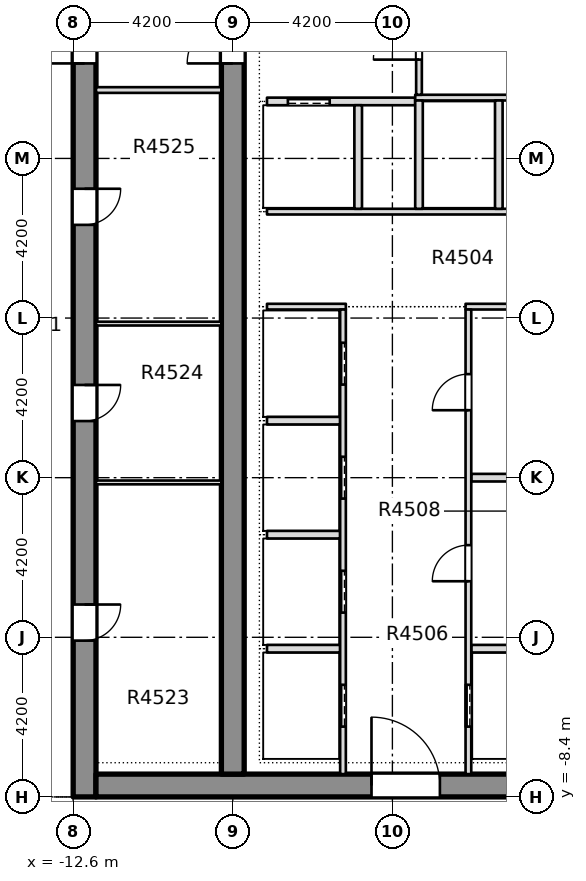
"""IFC4 building model, lengths in metres.
Left out: names, types, materials, properties, quantities, classifications, styles, units other than length and angle.
Written with IfcOpenShell. Run it as: python <this file> out.ifc"""

import sys

from ifc_helpers import new_model, si_unit, direction, frame, frame_2d, origin, place, context, subcontext, project, spatial, rectangle, extrude, element, fill, save


model = new_model("IFC4")
c1 = context("Model", 3, precision=1e-05, world=origin(), true_north=direction((0.0, 1.0)))
c2 = subcontext(c1, "Body", "Model", "MODEL_VIEW")
j1 = project(units=[si_unit("LENGTHUNIT", "METRE"), si_unit("PLANEANGLEUNIT", "RADIAN")], contexts=[c1])
p1 = place(None, origin())
s1 = spatial("IfcSite", under=j1, at=p1, CompositionType="ELEMENT")
p2 = place(p1, origin())
s2 = spatial("IfcBuilding", under=s1, at=p2, CompositionType="ELEMENT")
p3 = place(p2, frame((0.0, 0.0, 175.55)))
s3 = spatial("IfcBuildingStorey", under=s2, at=p3, CompositionType="ELEMENT", Elevation=175.55)
p4 = place(p3, frame((-12.3, -8.4, -0.4), z_axis=(0.0, 0.0, 1.0), x_axis=(0.0, 1.0, 0.0)))
e1 = element("IfcWall", 1, at=p4, inside=s3, PredefinedType="SHEAR", context=c2, shape_type="SweptSolid", body=[
    extrude(rectangle(XDim=30.15, YDim=0.6, at=frame_2d((15.075, 0.0))), origin(), (0.0, 0.0, 1.0), 3.45),
])
p5 = place(p4, frame((4.113, 0.0, 0.4)))
e2 = element("IfcOpeningElement", 2, at=p5, cuts=e1, PredefinedType="OPENING", context=c2, shape_type="SweptSolid", body=[
    extrude(rectangle(XDim=0.95, YDim=2.1, at=frame_2d((0.475, 1.05))), frame((0.0, 0.31, 0.0), z_axis=(0.0, -1.0, 0.0), x_axis=(1.0, 0.0, 0.0)), (0.0, 0.0, 1.0), 0.62),
])
p6 = place(p4, frame((9.89, 0.0, 0.4)))
e3 = element("IfcOpeningElement", 3, at=p6, cuts=e1, PredefinedType="OPENING", context=c2, shape_type="SweptSolid", body=[
    extrude(rectangle(XDim=0.95, YDim=2.1, at=frame_2d((0.475, 1.05))), frame((0.0, 0.31, 0.0), z_axis=(0.0, -1.0, 0.0), x_axis=(1.0, 0.0, 0.0)), (0.0, 0.0, 1.0), 0.62),
])
p7 = place(p4, frame((15.052, 0.0, 0.4)))
e4 = element("IfcOpeningElement", 4, at=p7, cuts=e1, PredefinedType="OPENING", context=c2, shape_type="SweptSolid", body=[
    extrude(rectangle(XDim=0.95, YDim=2.1, at=frame_2d((0.475, 1.05))), frame((0.0, 0.31, 0.0), z_axis=(0.0, -1.0, 0.0), x_axis=(1.0, 0.0, 0.0)), (0.0, 0.0, 1.0), 0.62),
])
p8 = place(p4, frame((22.144, 0.0, 0.4)))
e5 = element("IfcOpeningElement", 5, at=p8, cuts=e1, PredefinedType="OPENING", context=c2, shape_type="SweptSolid", body=[
    extrude(rectangle(XDim=0.95, YDim=2.1, at=frame_2d((0.475, 1.05))), frame((0.0, 0.31, 0.0), z_axis=(0.0, -1.0, 0.0), x_axis=(1.0, 0.0, 0.0)), (0.0, 0.0, 1.0), 0.62),
])
p9 = place(p4, frame((24.998, 0.0, 0.4)))
e6 = element("IfcOpeningElement", 6, at=p9, cuts=e1, PredefinedType="OPENING", context=c2, shape_type="SweptSolid", body=[
    extrude(rectangle(XDim=0.95, YDim=2.1, at=frame_2d((0.475, 1.05))), frame((0.0, 0.31, 0.0), z_axis=(0.0, -1.0, 0.0), x_axis=(1.0, 0.0, 0.0)), (0.0, 0.0, 1.0), 0.62),
])
p10 = place(p4, frame((27.605, 0.0, 0.4)))
e7 = element("IfcOpeningElement", 7, at=p10, cuts=e1, PredefinedType="OPENING", context=c2, shape_type="SweptSolid", body=[
    extrude(rectangle(XDim=0.95, YDim=2.1, at=frame_2d((0.475, 1.05))), frame((0.0, 0.31, 0.0), z_axis=(0.0, -1.0, 0.0), x_axis=(1.0, 0.0, 0.0)), (0.0, 0.0, 1.0), 0.62),
])
p11 = place(p4, frame((19.3, 0.0, 0.4)))
e8 = element("IfcOpeningElement", 8, at=p11, cuts=e1, PredefinedType="OPENING", context=c2, shape_type="SweptSolid", body=[
    extrude(rectangle(XDim=1.2, YDim=2.1, at=frame_2d((0.6, 1.05))), frame((0.0, 0.31, 0.0), z_axis=(0.0, -1.0, 0.0), x_axis=(1.0, 0.0, 0.0)), (0.0, 0.0, 1.0), 0.62),
])
p12 = place(p3, frame((-12.0, -8.1, -0.4), z_axis=(0.0, 0.0, 1.0), x_axis=(1.0, 0.0, 0.0)))
e9 = element("IfcWall", 9, at=p12, inside=s3, PredefinedType="SHEAR", context=c2, shape_type="SweptSolid", body=[
    extrude(rectangle(XDim=24.0, YDim=0.6, at=frame_2d((12.0, 0.0))), origin(), (0.0, 0.0, 1.0), 3.45),
])
p13 = place(p12, frame((7.25, 0.0, 0.4)))
e10 = element("IfcOpeningElement", 10, at=p13, cuts=e9, PredefinedType="OPENING", context=c2, shape_type="SweptSolid", body=[
    extrude(rectangle(XDim=1.8, YDim=2.1, at=frame_2d((0.9, 1.05))), frame((0.0, 0.31, 0.0), z_axis=(0.0, -1.0, 0.0), x_axis=(1.0, 0.0, 0.0)), (0.0, 0.0, 1.0), 0.62),
])
p14 = place(p12, frame((14.95, 0.0, 0.4)))
e11 = element("IfcOpeningElement", 11, at=p14, cuts=e9, PredefinedType="OPENING", context=c2, shape_type="SweptSolid", body=[
    extrude(rectangle(XDim=1.8, YDim=2.1, at=frame_2d((0.9, 1.05))), frame((0.0, 0.31, 0.0), z_axis=(0.0, -1.0, 0.0), x_axis=(1.0, 0.0, 0.0)), (0.0, 0.0, 1.0), 0.62),
])
p15 = place(p3, frame((-8.4, -7.8, -0.4), z_axis=(0.0, 0.0, 1.0), x_axis=(0.0, 1.0, 0.0)))
e12 = element("IfcWall", 12, at=p15, inside=s3, PredefinedType="SHEAR", context=c2, shape_type="SweptSolid", body=[
    extrude(rectangle(XDim=28.95, YDim=0.6, at=frame_2d((14.475, 0.0))), origin(), (0.0, 0.0, 1.0), 3.45),
])
p16 = place(p15, frame((18.7, 0.0, 0.4)))
e13 = element("IfcOpeningElement", 13, at=p16, cuts=e12, PredefinedType="OPENING", context=c2, shape_type="SweptSolid", body=[
    extrude(rectangle(XDim=1.2, YDim=2.1, at=frame_2d((0.6, 1.05))), frame((0.0, 0.31, 0.0), z_axis=(0.0, -1.0, 0.0), x_axis=(1.0, 0.0, 0.0)), (0.0, 0.0, 1.0), 0.62),
])
p17 = place(p3, frame((-7.5, -4.5, 0.0), z_axis=(0.0, 0.0, 1.0), x_axis=(1.0, 0.0, 0.0)))
e14 = element("IfcWall", 14, at=p17, inside=s3, PredefinedType="PARTITIONING", context=c2, shape_type="SweptSolid", body=[
    extrude(rectangle(XDim=1.925, YDim=0.2, at=frame_2d((0.962, 0.0))), origin(), (0.0, 0.0, 1.0), 3.05),
])
p18 = place(p3, frame((-2.125, -4.5, 0.0), z_axis=(0.0, 0.0, 1.0), x_axis=(1.0, 0.0, 0.0)))
e15 = element("IfcWall", 15, at=p18, inside=s3, PredefinedType="PARTITIONING", context=c2, shape_type="SweptSolid", body=[
    extrude(rectangle(XDim=2.025, YDim=0.2, at=frame_2d((1.012, 0.0))), origin(), (0.0, 0.0, 1.0), 3.05),
])
p19 = place(p3, frame((-7.5, -1.5, 0.0), z_axis=(0.0, 0.0, 1.0), x_axis=(1.0, 0.0, 0.0)))
e16 = element("IfcWall", 16, at=p19, inside=s3, PredefinedType="PARTITIONING", context=c2, shape_type="SweptSolid", body=[
    extrude(rectangle(XDim=1.925, YDim=0.2, at=frame_2d((0.962, 0.0))), origin(), (0.0, 0.0, 1.0), 3.05),
])
p20 = place(p3, frame((-2.125, 0.0, 0.0), z_axis=(0.0, 0.0, 1.0), x_axis=(1.0, 0.0, 0.0)))
e17 = element("IfcWall", 17, at=p20, inside=s3, PredefinedType="PARTITIONING", context=c2, shape_type="SweptSolid", body=[
    extrude(rectangle(XDim=2.025, YDim=0.2, at=frame_2d((1.012, 0.0))), origin(), (0.0, 0.0, 1.0), 3.05),
])
p21 = place(p3, frame((-7.5, 1.5, 0.0), z_axis=(0.0, 0.0, 1.0), x_axis=(1.0, 0.0, 0.0)))
e18 = element("IfcWall", 18, at=p21, inside=s3, PredefinedType="PARTITIONING", context=c2, shape_type="SweptSolid", body=[
    extrude(rectangle(XDim=1.925, YDim=0.2, at=frame_2d((0.962, 0.0))), origin(), (0.0, 0.0, 1.0), 3.05),
])
p22 = place(p3, frame((-7.5, 4.5, 0.0), z_axis=(0.0, 0.0, 1.0), x_axis=(1.0, 0.0, 0.0)))
e19 = element("IfcWall", 19, at=p22, inside=s3, PredefinedType="PARTITIONING", context=c2, shape_type="SweptSolid", body=[
    extrude(rectangle(XDim=2.075, YDim=0.15, at=frame_2d((1.038, 0.0))), origin(), (0.0, 0.0, 1.0), 3.05),
])
p23 = place(p3, frame((-2.275, 4.5, 0.0), z_axis=(0.0, 0.0, 1.0), x_axis=(1.0, 0.0, 0.0)))
e20 = element("IfcWall", 20, at=p23, inside=s3, PredefinedType="PARTITIONING", context=c2, shape_type="SweptSolid", body=[
    extrude(rectangle(XDim=4.55, YDim=0.15, at=frame_2d((2.275, 0.0))), origin(), (0.0, 0.0, 1.0), 3.05),
])
p24 = place(p3, frame((-7.5, 7.0, 0.0), z_axis=(0.0, 0.0, 1.0), x_axis=(1.0, 0.0, 0.0)))
e21 = element("IfcWall", 21, at=p24, inside=s3, PredefinedType="PARTITIONING", context=c2, shape_type="SweptSolid", body=[
    extrude(rectangle(XDim=15.0, YDim=0.15, at=frame_2d((7.5, 0.0))), origin(), (0.0, 0.0, 1.0), 3.05),
])
p25 = place(p24, frame((6.8, 0.0, 0.0)))
e22 = element("IfcOpeningElement", 22, at=p25, cuts=e21, PredefinedType="OPENING", context=c2, shape_type="SweptSolid", body=[
    extrude(rectangle(XDim=1.4, YDim=2.1, at=frame_2d((0.7, 1.05))), frame((0.0, 0.085, 0.0), z_axis=(0.0, -1.0, 0.0), x_axis=(1.0, 0.0, 0.0)), (0.0, 0.0, 1.0), 0.17),
])
p26 = place(p3, frame((-7.5, 9.9, 0.0), z_axis=(0.0, 0.0, 1.0), x_axis=(1.0, 0.0, 0.0)))
e23 = element("IfcWall", 23, at=p26, inside=s3, PredefinedType="PARTITIONING", context=c2, shape_type="SweptSolid", body=[
    extrude(rectangle(XDim=3.9, YDim=0.2, at=frame_2d((1.95, 0.0))), origin(), (0.0, 0.0, 1.0), 3.05),
])
p27 = place(p26, frame((0.55, 0.0, 0.0)))
e24 = element("IfcOpeningElement", 24, at=p27, cuts=e23, PredefinedType="OPENING", context=c2, shape_type="SweptSolid", body=[
    extrude(rectangle(XDim=1.1, YDim=2.1, at=frame_2d((0.55, 1.05))), frame((0.0, 0.11, 0.0), z_axis=(0.0, -1.0, 0.0), x_axis=(1.0, 0.0, 0.0)), (0.0, 0.0, 1.0), 0.22),
])
p28 = place(p3, frame((-3.6, 10.0, 0.0), z_axis=(0.0, 0.0, 1.0), x_axis=(1.0, 0.0, 0.0)))
e25 = element("IfcWall", 25, at=p28, inside=s3, PredefinedType="PARTITIONING", context=c2, shape_type="SweptSolid", body=[
    extrude(rectangle(XDim=7.2, YDim=0.15, at=frame_2d((3.6, 0.0))), origin(), (0.0, 0.0, 1.0), 3.05),
])
p29 = place(p28, frame((2.9, 0.0, 0.0)))
e26 = element("IfcOpeningElement", 26, at=p29, cuts=e25, PredefinedType="OPENING", context=c2, shape_type="SweptSolid", body=[
    extrude(rectangle(XDim=1.4, YDim=2.1, at=frame_2d((0.7, 1.05))), frame((0.0, 0.085, 0.0), z_axis=(0.0, -1.0, 0.0), x_axis=(1.0, 0.0, 0.0)), (0.0, 0.0, 1.0), 0.17),
])
p30 = place(p3, frame((-5.5, -7.799, 0.0), z_axis=(0.0, 0.0, 1.0), x_axis=(0.0, 1.0, 0.0)))
e27 = element("IfcWall", 27, at=p30, inside=s3, PredefinedType="PARTITIONING", context=c2, shape_type="SweptSolid", body=[
    extrude(rectangle(XDim=12.224, YDim=0.15, at=frame_2d((6.112, 0.0))), origin(), (0.0, 0.0, 1.0), 3.05),
])
p31 = place(p30, frame((1.249, 0.0, 0.0)))
e28 = element("IfcOpeningElement", 28, at=p31, cuts=e27, PredefinedType="OPENING", context=c2, shape_type="SweptSolid", body=[
    extrude(rectangle(XDim=1.1, YDim=2.1, at=frame_2d((0.55, 1.05))), frame((0.0, 0.085, 0.0), z_axis=(0.0, -1.0, 0.0), x_axis=(1.0, 0.0, 0.0)), (0.0, 0.0, 1.0), 0.17),
])
p32 = place(p30, frame((4.249, 0.0, 0.0)))
e29 = element("IfcOpeningElement", 29, at=p32, cuts=e27, PredefinedType="OPENING", context=c2, shape_type="SweptSolid", body=[
    extrude(rectangle(XDim=1.1, YDim=2.1, at=frame_2d((0.55, 1.05))), frame((0.0, 0.085, 0.0), z_axis=(0.0, -1.0, 0.0), x_axis=(1.0, 0.0, 0.0)), (0.0, 0.0, 1.0), 0.17),
])
p33 = place(p30, frame((7.249, 0.0, 0.0)))
e30 = element("IfcOpeningElement", 30, at=p33, cuts=e27, PredefinedType="OPENING", context=c2, shape_type="SweptSolid", body=[
    extrude(rectangle(XDim=1.1, YDim=2.1, at=frame_2d((0.55, 1.05))), frame((0.0, 0.085, 0.0), z_axis=(0.0, -1.0, 0.0), x_axis=(1.0, 0.0, 0.0)), (0.0, 0.0, 1.0), 0.17),
])
p34 = place(p30, frame((10.249, 0.0, 0.0)))
e31 = element("IfcOpeningElement", 31, at=p34, cuts=e27, PredefinedType="OPENING", context=c2, shape_type="SweptSolid", body=[
    extrude(rectangle(XDim=1.1, YDim=2.1, at=frame_2d((0.55, 1.05))), frame((0.0, 0.085, 0.0), z_axis=(0.0, -1.0, 0.0), x_axis=(1.0, 0.0, 0.0)), (0.0, 0.0, 1.0), 0.17),
])
p35 = place(p3, frame((-5.1, 7.075, 0.0), z_axis=(0.0, 0.0, 1.0), x_axis=(0.0, 1.0, 0.0)))
e32 = element("IfcWall", 32, at=p35, inside=s3, PredefinedType="PARTITIONING", context=c2, shape_type="SweptSolid", body=[
    extrude(rectangle(XDim=2.725, YDim=0.2, at=frame_2d((1.363, 0.0))), origin(), (0.0, 0.0, 1.0), 3.05),
])
p36 = place(p3, frame((-3.5, 7.075, 0.0), z_axis=(0.0, 0.0, 1.0), x_axis=(0.0, 1.0, 0.0)))
e33 = element("IfcWall", 33, at=p36, inside=s3, PredefinedType="PARTITIONING", context=c2, shape_type="SweptSolid", body=[
    extrude(rectangle(XDim=2.85, YDim=0.2, at=frame_2d((1.425, 0.0))), origin(), (0.0, 0.0, 1.0), 3.05),
])
p37 = place(p3, frame((-3.5, 10.075, 0.0), z_axis=(0.0, 0.0, 1.0), x_axis=(0.0, 1.0, 0.0)))
e34 = element("IfcWall", 34, at=p37, inside=s3, PredefinedType="PARTITIONING", context=c2, shape_type="SweptSolid", body=[
    extrude(rectangle(XDim=3.075, YDim=0.15, at=frame_2d((1.538, 0.0))), origin(), (0.0, 0.0, 1.0), 3.05),
])
p38 = place(p37, frame((0.925, 0.0, 0.0)))
e35 = element("IfcOpeningElement", 35, at=p38, cuts=e34, PredefinedType="OPENING", context=c2, shape_type="SweptSolid", body=[
    extrude(rectangle(XDim=1.2, YDim=2.1, at=frame_2d((0.6, 1.05))), frame((0.0, 0.085, 0.0), z_axis=(0.0, -1.0, 0.0), x_axis=(1.0, 0.0, 0.0)), (0.0, 0.0, 1.0), 0.17),
])
p39 = place(p3, frame((-2.2, -7.799, 0.0), z_axis=(0.0, 0.0, 1.0), x_axis=(0.0, 1.0, 0.0)))
e36 = element("IfcWall", 36, at=p39, inside=s3, PredefinedType="PARTITIONING", context=c2, shape_type="SweptSolid", body=[
    extrude(rectangle(XDim=12.224, YDim=0.15, at=frame_2d((6.112, 0.0))), origin(), (0.0, 0.0, 1.0), 3.05),
])
p40 = place(p39, frame((1.249, 0.0, 0.0)))
e37 = element("IfcOpeningElement", 37, at=p40, cuts=e36, PredefinedType="OPENING", context=c2, shape_type="SweptSolid", body=[
    extrude(rectangle(XDim=1.1, YDim=2.1, at=frame_2d((0.55, 1.05))), frame((0.0, 0.085, 0.0), z_axis=(0.0, -1.0, 0.0), x_axis=(1.0, 0.0, 0.0)), (0.0, 0.0, 1.0), 0.17),
])
p41 = place(p39, frame((5.074, 0.0, 0.0)))
e38 = element("IfcOpeningElement", 38, at=p41, cuts=e36, PredefinedType="OPENING", context=c2, shape_type="SweptSolid", body=[
    extrude(rectangle(XDim=0.95, YDim=2.1, at=frame_2d((0.475, 1.05))), frame((0.0, 0.085, 0.0), z_axis=(0.0, -1.0, 0.0), x_axis=(1.0, 0.0, 0.0)), (0.0, 0.0, 1.0), 0.17),
])
p42 = place(p39, frame((9.574, 0.0, 0.0)))
e39 = element("IfcOpeningElement", 39, at=p42, cuts=e36, PredefinedType="OPENING", context=c2, shape_type="SweptSolid", body=[
    extrude(rectangle(XDim=0.95, YDim=2.1, at=frame_2d((0.475, 1.05))), frame((0.0, 0.085, 0.0), z_axis=(0.0, -1.0, 0.0), x_axis=(1.0, 0.0, 0.0)), (0.0, 0.0, 1.0), 0.17),
])
p43 = place(p3, frame((-1.4, 7.075, 0.0), z_axis=(0.0, 0.0, 1.0), x_axis=(0.0, 1.0, 0.0)))
e40 = element("IfcWall", 40, at=p43, inside=s3, PredefinedType="PARTITIONING", context=c2, shape_type="SweptSolid", body=[
    extrude(rectangle(XDim=2.85, YDim=0.2, at=frame_2d((1.425, 0.0))), origin(), (0.0, 0.0, 1.0), 3.05),
])
for number, where, z_axis, x_axis in (
    (41, (-11.999, -0.125, 0.0), (0.0, 0.0, 1.0), (1.0, 0.0, 0.0)),
    (42, (-11.999, 4.054, 0.0), (0.0, 0.0, 1.0), (1.0, 0.0, 0.0)),
):
    element("IfcWall", number, at=place(p3, frame(where, z_axis=z_axis, x_axis=x_axis)), inside=s3, PredefinedType="PARTITIONING", context=c2, shape_type="SweptSolid", body=[
        extrude(rectangle(XDim=3.298, YDim=0.1, at=frame_2d((1.649, 0.0))), origin(), (0.0, 0.0, 1.0), 3.05),
    ])
p44 = place(p3, frame((-11.999, 10.2, 0.0), z_axis=(0.0, 0.0, 1.0), x_axis=(1.0, 0.0, 0.0)))
e43 = element("IfcWall", 43, at=p44, inside=s3, PredefinedType="PARTITIONING", context=c2, shape_type="SweptSolid", body=[
    extrude(rectangle(XDim=3.298, YDim=0.15, at=frame_2d((1.649, 0.0))), origin(), (0.0, 0.0, 1.0), 3.05),
])
p45 = place(p31, origin())
e44 = element("IfcDoor", 44, at=p45, inside=s3, OperationType="SLIDING_TO_LEFT", PredefinedType="DOOR", context=c2, shape_type="SweptSolid", body=[
    extrude(rectangle(XDim=1.1, YDim=2.1, at=frame_2d((0.55, 1.05))), frame((0.0, 0.025, 0.0), z_axis=(0.0, -1.0, 0.0), x_axis=(1.0, 0.0, 0.0)), (0.0, 0.0, 1.0), 0.05),
])
fill(e28, e44)
p46 = place(p32, origin())
e45 = element("IfcDoor", 45, at=p46, inside=s3, OperationType="SLIDING_TO_LEFT", PredefinedType="DOOR", context=c2, shape_type="SweptSolid", body=[
    extrude(rectangle(XDim=1.1, YDim=2.1, at=frame_2d((0.55, 1.05))), frame((0.0, 0.025, 0.0), z_axis=(0.0, -1.0, 0.0), x_axis=(1.0, 0.0, 0.0)), (0.0, 0.0, 1.0), 0.05),
])
fill(e29, e45)
p47 = place(p33, origin())
e46 = element("IfcDoor", 46, at=p47, inside=s3, OperationType="SLIDING_TO_LEFT", PredefinedType="DOOR", context=c2, shape_type="SweptSolid", body=[
    extrude(rectangle(XDim=1.1, YDim=2.1, at=frame_2d((0.55, 1.05))), frame((0.0, 0.025, 0.0), z_axis=(0.0, -1.0, 0.0), x_axis=(1.0, 0.0, 0.0)), (0.0, 0.0, 1.0), 0.05),
])
fill(e30, e46)
p48 = place(p34, origin())
e47 = element("IfcDoor", 47, at=p48, inside=s3, OperationType="SLIDING_TO_LEFT", PredefinedType="DOOR", context=c2, shape_type="SweptSolid", body=[
    extrude(rectangle(XDim=1.1, YDim=2.1, at=frame_2d((0.55, 1.05))), frame((0.0, 0.025, 0.0), z_axis=(0.0, -1.0, 0.0), x_axis=(1.0, 0.0, 0.0)), (0.0, 0.0, 1.0), 0.05),
])
fill(e31, e47)
p49 = place(p40, origin())
e48 = element("IfcDoor", 48, at=p49, inside=s3, OperationType="SLIDING_TO_LEFT", PredefinedType="DOOR", context=c2, shape_type="SweptSolid", body=[
    extrude(rectangle(XDim=1.1, YDim=2.1, at=frame_2d((0.55, 1.05))), frame((0.0, 0.025, 0.0), z_axis=(0.0, -1.0, 0.0), x_axis=(1.0, 0.0, 0.0)), (0.0, 0.0, 1.0), 0.05),
])
fill(e37, e48)
p50 = place(p41, origin())
e49 = element("IfcDoor", 49, at=p50, inside=s3, OperationType="SINGLE_SWING_LEFT", PredefinedType="DOOR", context=c2, shape_type="SweptSolid", body=[
    extrude(rectangle(XDim=0.95, YDim=2.1, at=frame_2d((0.475, 1.05))), frame((0.0, 0.025, 0.0), z_axis=(0.0, -1.0, 0.0), x_axis=(1.0, 0.0, 0.0)), (0.0, 0.0, 1.0), 0.05),
])
fill(e38, e49)
p51 = place(p42, origin())
e50 = element("IfcDoor", 50, at=p51, inside=s3, OperationType="SINGLE_SWING_RIGHT", PredefinedType="DOOR", context=c2, shape_type="SweptSolid", body=[
    extrude(rectangle(XDim=0.95, YDim=2.1, at=frame_2d((0.475, 1.05))), frame((0.0, 0.025, 0.0), z_axis=(0.0, -1.0, 0.0), x_axis=(1.0, 0.0, 0.0)), (0.0, 0.0, 1.0), 0.05),
])
fill(e39, e50)
p52 = place(p27, origin())
e51 = element("IfcDoor", 51, at=p52, inside=s3, OperationType="SLIDING_TO_RIGHT", PredefinedType="DOOR", context=c2, shape_type="SweptSolid", body=[
    extrude(rectangle(XDim=1.1, YDim=2.1, at=frame_2d((0.55, 1.05))), frame((0.0, 0.025, 0.0), z_axis=(0.0, -1.0, 0.0), x_axis=(1.0, 0.0, 0.0)), (0.0, 0.0, 1.0), 0.05),
])
fill(e24, e51)
p53 = place(p38, origin())
e52 = element("IfcDoor", 52, at=p53, inside=s3, OperationType="SINGLE_SWING_RIGHT", PredefinedType="DOOR", context=c2, shape_type="SweptSolid", body=[
    extrude(rectangle(XDim=1.2, YDim=2.1, at=frame_2d((0.6, 1.05))), frame((0.0, 0.025, 0.0), z_axis=(0.0, -1.0, 0.0), x_axis=(1.0, 0.0, 0.0)), (0.0, 0.0, 1.0), 0.05),
])
fill(e35, e52)
p54 = place(p13, origin())
e53 = element("IfcDoor", 53, at=p54, inside=s3, OperationType="SINGLE_SWING_LEFT", PredefinedType="DOOR", context=c2, shape_type="SweptSolid", body=[
    extrude(rectangle(XDim=1.8, YDim=2.1, at=frame_2d((0.9, 1.05))), frame((0.0, 0.025, 0.0), z_axis=(0.0, -1.0, 0.0), x_axis=(1.0, 0.0, 0.0)), (0.0, 0.0, 1.0), 0.05),
])
fill(e10, e53)
p55 = place(p5, origin())
e54 = element("IfcDoor", 54, at=p55, inside=s3, OperationType="SINGLE_SWING_LEFT", PredefinedType="DOOR", context=c2, shape_type="SweptSolid", body=[
    extrude(rectangle(XDim=0.95, YDim=2.1, at=frame_2d((0.475, 1.05))), frame((0.0, 0.025, 0.0), z_axis=(0.0, -1.0, 0.0), x_axis=(1.0, 0.0, 0.0)), (0.0, 0.0, 1.0), 0.05),
])
fill(e2, e54)
p56 = place(p6, origin())
e55 = element("IfcDoor", 55, at=p56, inside=s3, OperationType="SINGLE_SWING_LEFT", PredefinedType="DOOR", context=c2, shape_type="SweptSolid", body=[
    extrude(rectangle(XDim=0.95, YDim=2.1, at=frame_2d((0.475, 1.05))), frame((0.0, 0.025, 0.0), z_axis=(0.0, -1.0, 0.0), x_axis=(1.0, 0.0, 0.0)), (0.0, 0.0, 1.0), 0.05),
])
fill(e3, e55)
p57 = place(p7, origin())
e56 = element("IfcDoor", 56, at=p57, inside=s3, OperationType="SINGLE_SWING_LEFT", PredefinedType="DOOR", context=c2, shape_type="SweptSolid", body=[
    extrude(rectangle(XDim=0.95, YDim=2.1, at=frame_2d((0.475, 1.05))), frame((0.0, 0.025, 0.0), z_axis=(0.0, -1.0, 0.0), x_axis=(1.0, 0.0, 0.0)), (0.0, 0.0, 1.0), 0.05),
])
fill(e4, e56)
p58 = place(p11, origin())
e57 = element("IfcDoor", 57, at=p58, inside=s3, OperationType="SINGLE_SWING_LEFT", PredefinedType="DOOR", context=c2, shape_type="SweptSolid", body=[
    extrude(rectangle(XDim=1.2, YDim=2.1, at=frame_2d((0.6, 1.05))), frame((0.0, 0.025, 0.0), z_axis=(0.0, -1.0, 0.0), x_axis=(1.0, 0.0, 0.0)), (0.0, 0.0, 1.0), 0.05),
])
fill(e8, e57)
p59 = place(p16, origin())
e58 = element("IfcDoor", 58, at=p59, inside=s3, OperationType="SINGLE_SWING_LEFT", PredefinedType="DOOR", context=c2, shape_type="SweptSolid", body=[
    extrude(rectangle(XDim=1.2, YDim=2.1, at=frame_2d((0.6, 1.05))), frame((0.0, 0.025, 0.0), z_axis=(0.0, -1.0, 0.0), x_axis=(1.0, 0.0, 0.0)), (0.0, 0.0, 1.0), 0.05),
])
fill(e13, e58)
save(model, sys.argv[1])
